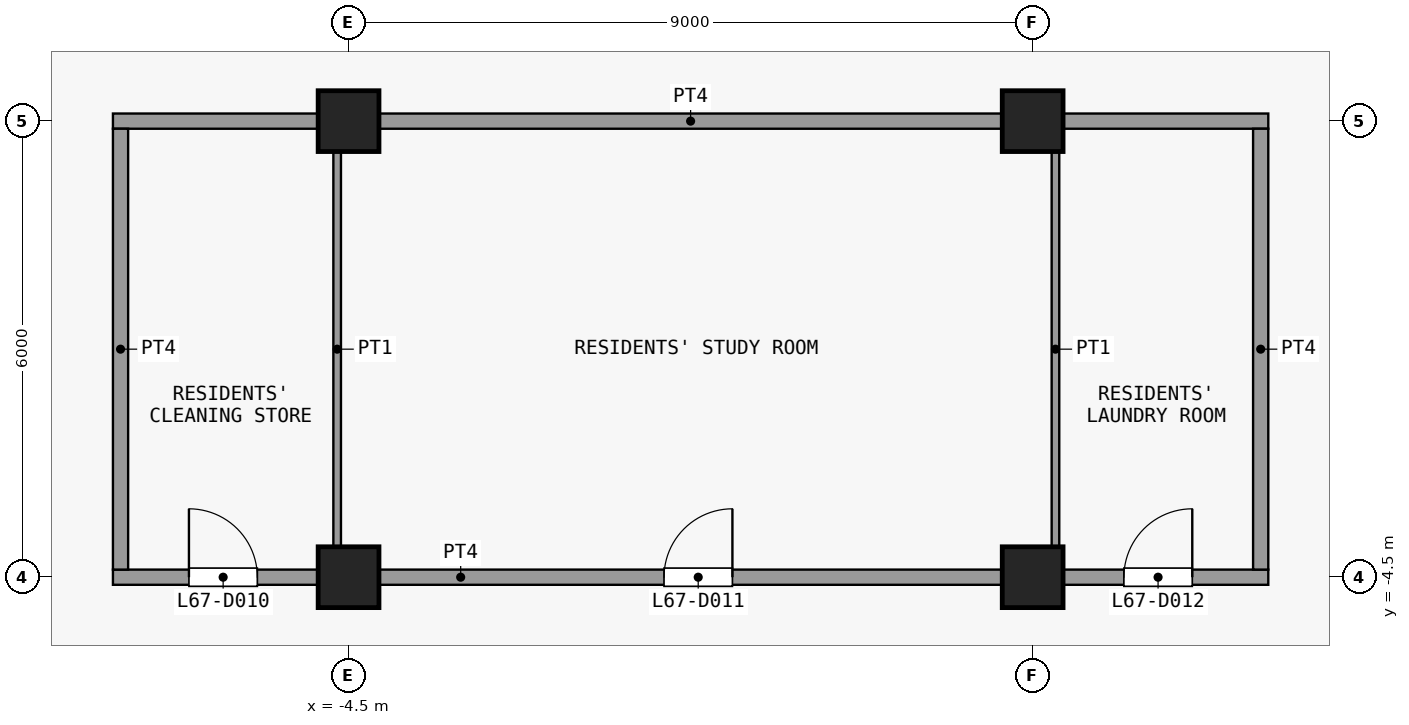
"""IFC4 building model, lengths in metres.
Left out: names, types, materials, properties, quantities, classifications, styles, units other than length and angle.
Written with IfcOpenShell. Run it as: python <this file> out.ifc"""

import sys

from ifc_helpers import new_model, si_unit, direction, frame, frame_2d, origin, origin_2d, place, context, subcontext, project, spatial, rectangle, extrude, element, fill, save


model = new_model("IFC4")
c1 = context("Model", 3, precision=1e-05, world=origin(), true_north=direction((0.0, 1.0)))
c2 = subcontext(c1, "Body", "Model", "MODEL_VIEW")
j1 = project(units=[si_unit("LENGTHUNIT", "METRE"), si_unit("PLANEANGLEUNIT", "RADIAN")], contexts=[c1])
p1 = place(None, origin())
s1 = spatial("IfcSite", under=j1, at=p1, CompositionType="ELEMENT")
p2 = place(p1, origin())
s2 = spatial("IfcBuilding", under=s1, at=p2, CompositionType="ELEMENT")
p3 = place(p2, frame((0.0, 0.0, 266.3)))
s3 = spatial("IfcBuildingStorey", under=s2, at=p3, CompositionType="ELEMENT", Elevation=266.3)
for number, where, z_axis, x_axis in (
    (1, (-4.5, -4.5, 0.0), (0.0, 0.0, 1.0), (1.0, 0.0, 0.0)),
    (2, (-4.5, 1.5, 0.0), (0.0, 0.0, 1.0), (1.0, 0.0, 0.0)),
    (3, (4.5, -4.5, 0.0), (0.0, 0.0, 1.0), (1.0, 0.0, 0.0)),
    (4, (4.5, 1.5, 0.0), (0.0, 0.0, 1.0), (1.0, 0.0, 0.0)),
):
    element("IfcColumn", number, at=place(p3, frame(where, z_axis=z_axis, x_axis=x_axis)), inside=s3, PredefinedType="COLUMN", context=c2, shape_type="SweptSolid", body=[
        extrude(rectangle(XDim=0.8, YDim=0.8, at=origin_2d()), origin(), (0.0, 0.0, 1.0), 3.6),
    ])
p4 = place(p3, frame((-7.6, -4.5, 0.0), z_axis=(0.0, 0.0, 1.0), x_axis=(1.0, 0.0, 0.0)))
e5 = element("IfcWall", 5, at=p4, inside=s3, PredefinedType="PARTITIONING", context=c2, shape_type="SweptSolid", body=[
    extrude(rectangle(XDim=15.2, YDim=0.2, at=frame_2d((7.6, 0.0))), origin(), (0.0, 0.0, 1.0), 3.3),
])
p5 = place(p4, frame((1.0, 0.0, 0.0)))
e6 = element("IfcOpeningElement", 6, at=p5, cuts=e5, PredefinedType="OPENING", context=c2, shape_type="SweptSolid", body=[
    extrude(rectangle(XDim=0.9, YDim=2.1, at=frame_2d((0.45, 1.05))), frame((0.0, 0.11, 0.0), z_axis=(0.0, -1.0, 0.0), x_axis=(1.0, 0.0, 0.0)), (0.0, 0.0, 1.0), 0.22),
])
p6 = place(p4, frame((7.25, 0.0, 0.0)))
e7 = element("IfcOpeningElement", 7, at=p6, cuts=e5, PredefinedType="OPENING", context=c2, shape_type="SweptSolid", body=[
    extrude(rectangle(XDim=0.9, YDim=2.1, at=frame_2d((0.45, 1.05))), frame((0.0, 0.11, 0.0), z_axis=(0.0, -1.0, 0.0), x_axis=(1.0, 0.0, 0.0)), (0.0, 0.0, 1.0), 0.22),
])
p7 = place(p4, frame((13.3, 0.0, 0.0)))
e8 = element("IfcOpeningElement", 8, at=p7, cuts=e5, PredefinedType="OPENING", context=c2, shape_type="SweptSolid", body=[
    extrude(rectangle(XDim=0.9, YDim=2.1, at=frame_2d((0.45, 1.05))), frame((0.0, 0.11, 0.0), z_axis=(0.0, -1.0, 0.0), x_axis=(1.0, 0.0, 0.0)), (0.0, 0.0, 1.0), 0.22),
])
p8 = place(p3, frame((-7.6, 1.5, 0.0), z_axis=(0.0, 0.0, 1.0), x_axis=(1.0, 0.0, 0.0)))
e9 = element("IfcWall", 9, at=p8, inside=s3, PredefinedType="PARTITIONING", context=c2, shape_type="SweptSolid", body=[
    extrude(rectangle(XDim=15.2, YDim=0.2, at=frame_2d((7.6, 0.0))), origin(), (0.0, 0.0, 1.0), 3.3),
])
p9 = place(p3, frame((-7.5, -4.4, 0.0), z_axis=(0.0, 0.0, 1.0), x_axis=(0.0, 1.0, 0.0)))
e10 = element("IfcWall", 10, at=p9, inside=s3, PredefinedType="PARTITIONING", context=c2, shape_type="SweptSolid", body=[
    extrude(rectangle(XDim=5.8, YDim=0.2, at=frame_2d((2.9, 0.0))), origin(), (0.0, 0.0, 1.0), 3.3),
])
for number, where, z_axis, x_axis in (
    (11, (-4.65, -4.4, 0.0), (0.0, 0.0, 1.0), (0.0, 1.0, 0.0)),
    (12, (4.8, -4.4, 0.0), (0.0, 0.0, 1.0), (0.0, 1.0, 0.0)),
):
    element("IfcWall", number, at=place(p3, frame(where, z_axis=z_axis, x_axis=x_axis)), inside=s3, PredefinedType="PARTITIONING", context=c2, shape_type="SweptSolid", body=[
        extrude(rectangle(XDim=5.8, YDim=0.1, at=frame_2d((2.9, 0.0))), origin(), (0.0, 0.0, 1.0), 3.3),
    ])
p10 = place(p3, frame((7.5, -4.4, 0.0), z_axis=(0.0, 0.0, 1.0), x_axis=(0.0, 1.0, 0.0)))
e13 = element("IfcWall", 13, at=p10, inside=s3, PredefinedType="PARTITIONING", context=c2, shape_type="SweptSolid", body=[
    extrude(rectangle(XDim=5.8, YDim=0.2, at=frame_2d((2.9, 0.0))), origin(), (0.0, 0.0, 1.0), 3.3),
])
p11 = place(p5, origin())
e14 = element("IfcDoor", 14, at=p11, inside=s3, OperationType="SINGLE_SWING_RIGHT", PredefinedType="DOOR", context=c2, shape_type="SweptSolid", body=[
    extrude(rectangle(XDim=0.9, YDim=2.1, at=frame_2d((0.45, 1.05))), frame((0.0, 0.025, 0.0), z_axis=(0.0, -1.0, 0.0), x_axis=(1.0, 0.0, 0.0)), (0.0, 0.0, 1.0), 0.05),
])
fill(e6, e14)
p12 = place(p6, origin())
e15 = element("IfcDoor", 15, at=p12, inside=s3, OperationType="SINGLE_SWING_LEFT", PredefinedType="DOOR", context=c2, shape_type="SweptSolid", body=[
    extrude(rectangle(XDim=0.9, YDim=2.1, at=frame_2d((0.45, 1.05))), frame((0.0, 0.025, 0.0), z_axis=(0.0, -1.0, 0.0), x_axis=(1.0, 0.0, 0.0)), (0.0, 0.0, 1.0), 0.05),
])
fill(e7, e15)
p13 = place(p7, origin())
e16 = element("IfcDoor", 16, at=p13, inside=s3, OperationType="SINGLE_SWING_LEFT", PredefinedType="DOOR", context=c2, shape_type="SweptSolid", body=[
    extrude(rectangle(XDim=0.9, YDim=2.1, at=frame_2d((0.45, 1.05))), frame((0.0, 0.025, 0.0), z_axis=(0.0, -1.0, 0.0), x_axis=(1.0, 0.0, 0.0)), (0.0, 0.0, 1.0), 0.05),
])
fill(e8, e16)
save(model, sys.argv[1])
